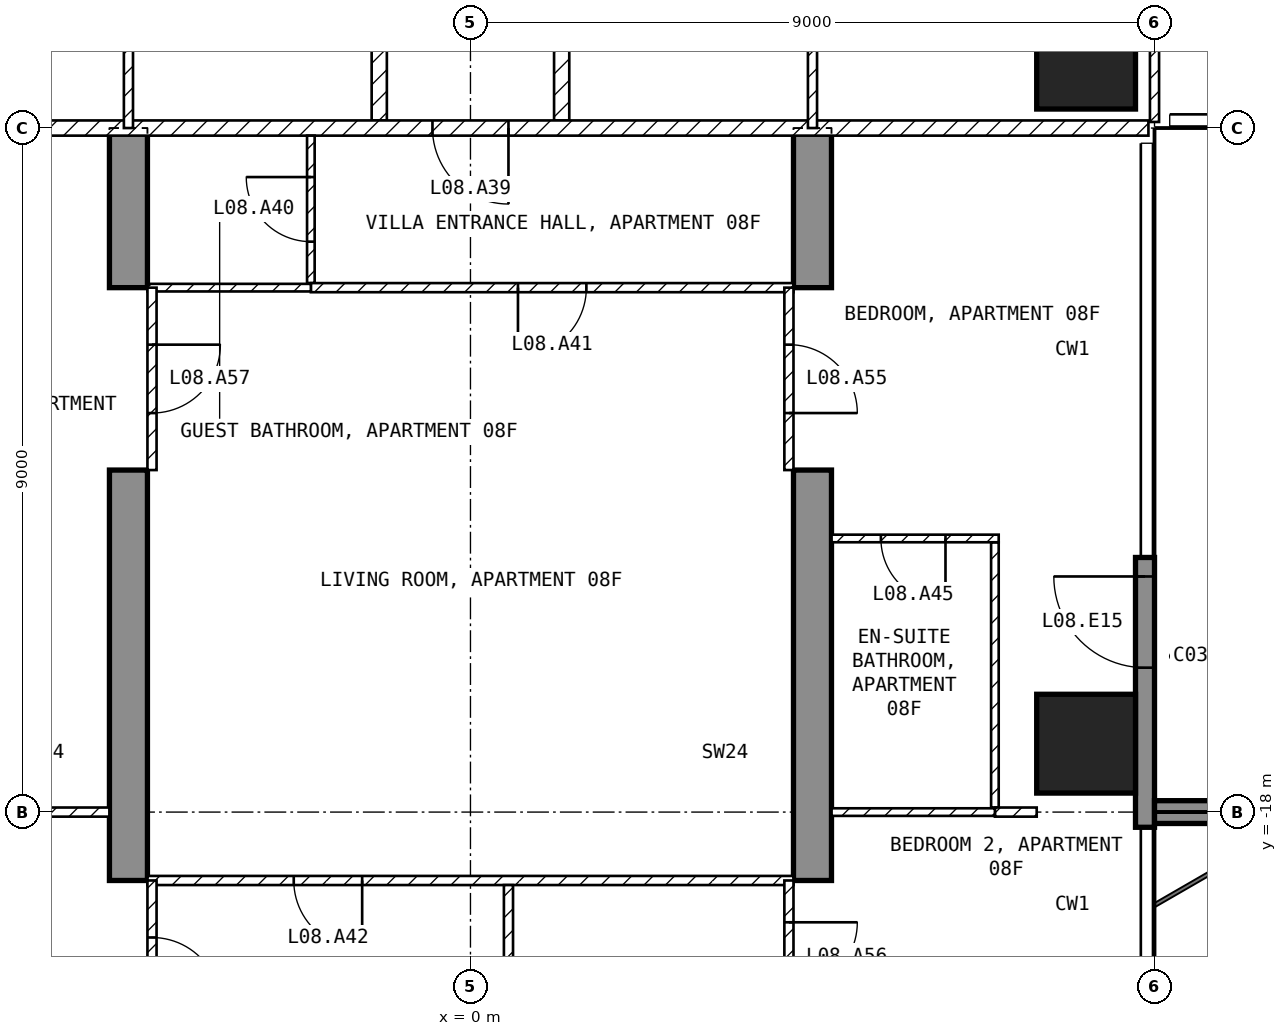
"""IFC4 building model, lengths in metres.
Left out: names, types, materials, properties, quantities, classifications, styles, units other than length and angle.
Written with IfcOpenShell. Run it as: python <this file> out.ifc"""

import sys

from ifc_helpers import new_model, si_unit, direction, frame, frame_2d, origin, origin_2d, place, context, subcontext, project, spatial, polyline, rectangle, outline, extrude, element, fill, save


model = new_model("IFC4")
c1 = context("Model", 3, precision=1e-05, world=origin(), true_north=direction((0.0, 1.0)))
c2 = subcontext(c1, "Body", "Model", "MODEL_VIEW")
j1 = project(units=[si_unit("LENGTHUNIT", "METRE"), si_unit("PLANEANGLEUNIT", "RADIAN")], contexts=[c1])
p1 = place(None, origin())
s1 = spatial("IfcSite", under=j1, at=p1, CompositionType="ELEMENT")
p2 = place(p1, origin())
s2 = spatial("IfcBuilding", under=s1, at=p2, CompositionType="ELEMENT")
p3 = place(p2, frame((0.0, 0.0, 47.0)))
s3 = spatial("IfcBuildingStorey", under=s2, at=p3, CompositionType="ELEMENT", Elevation=47.0)
for number, where, z_axis, x_axis in (
    (1, (8.1, -17.1, -0.25), (0.0, 0.0, 1.0), (1.0, 0.0, 0.0)),
    (2, (8.1, -8.1, -0.25), (0.0, 0.0, 1.0), (1.0, 0.0, 0.0)),
):
    element("IfcColumn", number, at=place(p3, frame(where, z_axis=z_axis, x_axis=x_axis)), inside=s3, PredefinedType="COLUMN", context=c2, shape_type="SweptSolid", body=[
        extrude(rectangle(XDim=1.3, YDim=1.3, at=origin_2d()), origin(), (0.0, 0.0, 1.0), 3.5),
    ])
for number, where, z_axis, x_axis in (
    (3, (-4.75, -25.45, -0.25), (1.0, 0.0, 0.0), (0.0, 1.0, 0.0)),
    (4, (4.25, -25.45, -0.25), (1.0, 0.0, 0.0), (0.0, 1.0, 0.0)),
):
    element("IfcWall", number, at=place(p3, frame(where, z_axis=z_axis, x_axis=x_axis)), inside=s3, PredefinedType="SHEAR", context=c2, shape_type="SweptSolid", body=[
        extrude(outline(polyline([(0.0, 0.0), (4.15, 0.0), (4.15, 2.65), (6.55, 2.65), (6.55, 0.0), (11.95, 0.0), (11.95, 2.65), (14.35, 2.65), (14.35, 0.0), (16.45, 0.0), (16.45, 3.5), (0.0, 3.5), (0.0, 0.0)])), origin(), (0.0, 0.0, 1.0), 0.5),
    ])
p4 = place(p3, frame((8.875, -18.2, 0.0), z_axis=(0.0, 0.0, 1.0), x_axis=(0.0, 1.0, 0.0)))
e5 = element("IfcWall", 5, at=p4, inside=s3, PredefinedType="SOLIDWALL", context=c2, shape_type="SweptSolid", body=[
    extrude(rectangle(XDim=3.55, YDim=0.25, at=frame_2d((1.775, 0.0))), origin(), (0.0, 0.0, 1.0), 3.25),
])
p5 = place(p4, frame((2.1, 0.0, 0.0)))
e6 = element("IfcOpeningElement", 6, at=p5, cuts=e5, PredefinedType="OPENING", context=c2, shape_type="SweptSolid", body=[
    extrude(rectangle(XDim=1.2, YDim=2.4, at=frame_2d((0.6, 1.2))), frame((0.0, 0.135, 0.0), z_axis=(0.0, -1.0, 0.0), x_axis=(1.0, 0.0, 0.0)), (0.0, 0.0, 1.0), 0.27),
])
p6 = place(p3, frame((9.0, -18.0, 0.0), z_axis=(0.0, 0.0, 1.0), x_axis=(1.0, 0.0, 0.0)))
e7 = element("IfcWall", 7, at=p6, inside=s3, PredefinedType="SOLIDWALL", context=c2, shape_type="SweptSolid", body=[
    extrude(rectangle(XDim=2.7, YDim=0.3, at=frame_2d((1.35, 0.0))), origin(), (0.0, 0.0, 1.0), 3.25),
])
for number, where, z_axis, x_axis in (
    (8, (1.2, -1.3, 0.0), (0.0, 0.0, 1.0), (0.0, -1.0, 0.0)),
    (9, (-1.2, -8.9, 0.0), (0.0, 0.0, 1.0), (0.0, 1.0, 0.0)),
):
    element("IfcWall", number, at=place(p3, frame(where, z_axis=z_axis, x_axis=x_axis)), inside=s3, PredefinedType="PARTITIONING", context=c2, shape_type="SweptSolid", body=[
        extrude(rectangle(XDim=7.6, YDim=0.2, at=frame_2d((3.8, 0.0))), origin(), (0.0, 0.0, 1.0), 3.25),
    ])
p7 = place(p3, frame((8.92, -9.0, 0.0), z_axis=(0.0, 0.0, 1.0), x_axis=(-1.0, 0.0, 0.0)))
e10 = element("IfcWall", 10, at=p7, inside=s3, PredefinedType="PARTITIONING", context=c2, shape_type="SweptSolid", body=[
    extrude(rectangle(XDim=17.84, YDim=0.2, at=frame_2d((8.92, 0.0))), origin(), (0.0, 0.0, 1.0), 3.25),
])
p8 = place(p7, frame((8.42, 0.0, 0.0)))
e11 = element("IfcOpeningElement", 11, at=p8, cuts=e10, PredefinedType="OPENING", context=c2, shape_type="SweptSolid", body=[
    extrude(rectangle(XDim=1.0, YDim=2.1, at=frame_2d((0.5, 1.05))), frame((0.0, 0.11, 0.0), z_axis=(0.0, -1.0, 0.0), x_axis=(1.0, 0.0, 0.0)), (0.0, 0.0, 1.0), 0.22),
])
p9 = place(p3, frame((9.0, -8.92, 0.0), z_axis=(0.0, 0.0, 1.0), x_axis=(0.0, 1.0, 0.0)))
e12 = element("IfcWall", 12, at=p9, inside=s3, PredefinedType="PARTITIONING", context=c2, shape_type="SweptSolid", body=[
    extrude(rectangle(XDim=7.62, YDim=0.12, at=frame_2d((3.81, 0.0))), origin(), (0.0, 0.0, 1.0), 3.25),
])
p10 = place(p9, frame((2.67, 0.0, 0.0)))
e13 = element("IfcOpeningElement", 13, at=p10, cuts=e12, PredefinedType="OPENING", context=c2, shape_type="SweptSolid", body=[
    extrude(rectangle(XDim=0.9, YDim=2.1, at=frame_2d((0.45, 1.05))), frame((0.0, 0.07, 0.0), z_axis=(0.0, -1.0, 0.0), x_axis=(1.0, 0.0, 0.0)), (0.0, 0.0, 1.0), 0.14),
])
p11 = place(p3, frame((4.5, -9.0, 0.0), z_axis=(0.0, 0.0, 1.0), x_axis=(0.0, 1.0, 0.0)))
e14 = element("IfcWall", 14, at=p11, inside=s3, PredefinedType="PARTITIONING", context=c2, shape_type="SweptSolid", body=[
    extrude(rectangle(XDim=3.9, YDim=0.12, at=frame_2d((1.95, 0.0))), origin(), (0.0, 0.0, 1.0), 3.25),
])
p12 = place(p11, frame((1.5, 0.0, 0.0)))
e15 = element("IfcOpeningElement", 15, at=p12, cuts=e14, PredefinedType="OPENING", context=c2, shape_type="SweptSolid", body=[
    extrude(rectangle(XDim=0.9, YDim=2.1, at=frame_2d((0.45, 1.05))), frame((0.0, 0.07, 0.0), z_axis=(0.0, -1.0, 0.0), x_axis=(1.0, 0.0, 0.0)), (0.0, 0.0, 1.0), 0.14),
])
p13 = place(p3, frame((-4.5, -1.3, 0.0), z_axis=(0.0, 0.0, 1.0), x_axis=(0.0, -1.0, 0.0)))
e16 = element("IfcWall", 16, at=p13, inside=s3, PredefinedType="PARTITIONING", context=c2, shape_type="SweptSolid", body=[
    extrude(rectangle(XDim=7.7, YDim=0.12, at=frame_2d((3.85, 0.0))), origin(), (0.0, 0.0, 1.0), 3.25),
])
p14 = place(p13, frame((4.988, 0.0, 0.0)))
e17 = element("IfcOpeningElement", 17, at=p14, cuts=e16, PredefinedType="OPENING", context=c2, shape_type="SweptSolid", body=[
    extrude(rectangle(XDim=0.9, YDim=2.1, at=frame_2d((0.45, 1.05))), frame((0.0, 0.07, 0.0), z_axis=(0.0, -1.0, 0.0), x_axis=(1.0, 0.0, 0.0)), (0.0, 0.0, 1.0), 0.14),
])
p15 = place(p3, frame((-2.1, -11.04, 0.0), z_axis=(0.0, 0.0, 1.0), x_axis=(0.0, 1.0, 0.0)))
e18 = element("IfcWall", 18, at=p15, inside=s3, PredefinedType="PARTITIONING", context=c2, shape_type="SweptSolid", body=[
    extrude(rectangle(XDim=1.94, YDim=0.1, at=frame_2d((0.97, 0.0))), origin(), (0.0, 0.0, 1.0), 3.25),
])
p16 = place(p15, frame((0.545, 0.0, 0.0)))
e19 = element("IfcOpeningElement", 19, at=p16, cuts=e18, PredefinedType="OPENING", context=c2, shape_type="SweptSolid", body=[
    extrude(rectangle(XDim=0.85, YDim=2.1, at=frame_2d((0.425, 1.05))), frame((0.0, 0.06, 0.0), z_axis=(0.0, -1.0, 0.0), x_axis=(1.0, 0.0, 0.0)), (0.0, 0.0, 1.0), 0.12),
])
p17 = place(p3, frame((4.25, -11.1, 0.0), z_axis=(0.0, 0.0, 1.0), x_axis=(-1.0, 0.0, 0.0)))
e20 = element("IfcWall", 20, at=p17, inside=s3, PredefinedType="PARTITIONING", context=c2, shape_type="SweptSolid", body=[
    extrude(rectangle(XDim=6.35, YDim=0.12, at=frame_2d((3.175, 0.0))), origin(), (0.0, 0.0, 1.0), 3.25),
])
p18 = place(p17, frame((2.725, 0.0, 0.0)))
e21 = element("IfcOpeningElement", 21, at=p18, cuts=e20, PredefinedType="OPENING", context=c2, shape_type="SweptSolid", body=[
    extrude(rectangle(XDim=0.9, YDim=2.1, at=frame_2d((0.45, 1.05))), frame((0.0, 0.07, 0.0), z_axis=(0.0, -1.0, 0.0), x_axis=(1.0, 0.0, 0.0)), (0.0, 0.0, 1.0), 0.14),
])
p19 = place(p3, frame((-2.1, -11.1, 0.0), z_axis=(0.0, 0.0, 1.0), x_axis=(-1.0, 0.0, 0.0)))
e22 = element("IfcWall", 22, at=p19, inside=s3, PredefinedType="PARTITIONING", context=c2, shape_type="SweptSolid", body=[
    extrude(rectangle(XDim=2.15, YDim=0.1, at=frame_2d((1.075, 0.0))), origin(), (0.0, 0.0, 1.0), 3.25),
])
p20 = place(p3, frame((4.25, -18.9, 0.0), z_axis=(0.0, 0.0, 1.0), x_axis=(-1.0, 0.0, 0.0)))
e23 = element("IfcWall", 23, at=p20, inside=s3, PredefinedType="PARTITIONING", context=c2, shape_type="SweptSolid", body=[
    extrude(rectangle(XDim=8.5, YDim=0.12, at=frame_2d((4.25, 0.0))), origin(), (0.0, 0.0, 1.0), 3.25),
])
p21 = place(p20, frame((5.675, 0.0, 0.0)))
e24 = element("IfcOpeningElement", 24, at=p21, cuts=e23, PredefinedType="OPENING", context=c2, shape_type="SweptSolid", body=[
    extrude(rectangle(XDim=0.9, YDim=2.1, at=frame_2d((0.45, 1.05))), frame((0.0, 0.07, 0.0), z_axis=(0.0, -1.0, 0.0), x_axis=(1.0, 0.0, 0.0)), (0.0, 0.0, 1.0), 0.14),
])
p22 = place(p3, frame((0.5, -18.96, 0.0), z_axis=(0.0, 0.0, 1.0), x_axis=(0.0, -1.0, 0.0)))
e25 = element("IfcWall", 25, at=p22, inside=s3, PredefinedType="PARTITIONING", context=c2, shape_type="SweptSolid", body=[
    extrude(rectangle(XDim=4.38, YDim=0.12, at=frame_2d((2.19, 0.0))), origin(), (0.0, 0.0, 1.0), 3.25),
])
p23 = place(p22, frame((1.74, 0.0, 0.0)))
e26 = element("IfcOpeningElement", 26, at=p23, cuts=e25, PredefinedType="OPENING", context=c2, shape_type="SweptSolid", body=[
    extrude(rectangle(XDim=0.9, YDim=2.1, at=frame_2d((0.45, 1.05))), frame((0.0, 0.07, 0.0), z_axis=(0.0, -1.0, 0.0), x_axis=(1.0, 0.0, 0.0)), (0.0, 0.0, 1.0), 0.14),
])
p24 = place(p3, frame((6.9, -17.94, 0.0), z_axis=(0.0, 0.0, 1.0), x_axis=(0.0, 1.0, 0.0)))
e27 = element("IfcWall", 27, at=p24, inside=s3, PredefinedType="PARTITIONING", context=c2, shape_type="SweptSolid", body=[
    extrude(rectangle(XDim=3.49, YDim=0.1, at=frame_2d((1.745, 0.0))), origin(), (0.0, 0.0, 1.0), 3.25),
])
p25 = place(p3, frame((6.95, -14.4, 0.0), z_axis=(0.0, 0.0, 1.0), x_axis=(-1.0, 0.0, 0.0)))
e28 = element("IfcWall", 28, at=p25, inside=s3, PredefinedType="PARTITIONING", context=c2, shape_type="SweptSolid", body=[
    extrude(rectangle(XDim=2.2, YDim=0.1, at=frame_2d((1.1, 0.0))), origin(), (0.0, 0.0, 1.0), 3.25),
])
p26 = place(p25, frame((0.7, 0.0, 0.0)))
e29 = element("IfcOpeningElement", 29, at=p26, cuts=e28, PredefinedType="OPENING", context=c2, shape_type="SweptSolid", body=[
    extrude(rectangle(XDim=0.85, YDim=2.1, at=frame_2d((0.425, 1.05))), frame((0.0, 0.06, 0.0), z_axis=(0.0, -1.0, 0.0), x_axis=(1.0, 0.0, 0.0)), (0.0, 0.0, 1.0), 0.12),
])
p27 = place(p3, frame((7.45, -18.0, 0.0), z_axis=(0.0, 0.0, 1.0), x_axis=(-1.0, 0.0, 0.0)))
e30 = element("IfcWall", 30, at=p27, inside=s3, PredefinedType="PARTITIONING", context=c2, shape_type="SweptSolid", body=[
    extrude(rectangle(XDim=0.55, YDim=0.12, at=frame_2d((0.275, 0.0))), origin(), (0.0, 0.0, 1.0), 3.25),
])
p28 = place(p3, frame((6.9, -18.0, 0.0), z_axis=(0.0, 0.0, 1.0), x_axis=(-1.0, 0.0, 0.0)))
e31 = element("IfcWall", 31, at=p28, inside=s3, PredefinedType="PARTITIONING", context=c2, shape_type="SweptSolid", body=[
    extrude(rectangle(XDim=2.15, YDim=0.1, at=frame_2d((1.075, 0.0))), origin(), (0.0, 0.0, 1.0), 3.25),
])
p29 = place(p3, frame((-4.75, -18.0, 0.0), z_axis=(0.0, 0.0, 1.0), x_axis=(-1.0, 0.0, 0.0)))
e32 = element("IfcWall", 32, at=p29, inside=s3, PredefinedType="PARTITIONING", context=c2, shape_type="SweptSolid", body=[
    extrude(rectangle(XDim=2.7, YDim=0.12, at=frame_2d((1.35, 0.0))), origin(), (0.0, 0.0, 1.0), 3.25),
])
p30 = place(p3, frame((4.19, -11.1, 0.0), z_axis=(0.0, 0.0, 1.0), x_axis=(0.0, -1.0, 0.0)))
e33 = element("IfcWall", 33, at=p30, inside=s3, PredefinedType="PARTITIONING", context=c2, shape_type="SweptSolid", body=[
    extrude(rectangle(XDim=2.4, YDim=0.12, at=frame_2d((1.2, 0.0))), origin(), (0.0, 0.0, 1.0), 2.4),
])
p31 = place(p30, frame((0.75, 0.0, 0.0)))
e34 = element("IfcOpeningElement", 34, at=p31, cuts=e33, PredefinedType="OPENING", context=c2, shape_type="SweptSolid", body=[
    extrude(rectangle(XDim=0.9, YDim=2.1, at=frame_2d((0.45, 1.05))), frame((0.0, 0.07, 0.0), z_axis=(0.0, -1.0, 0.0), x_axis=(1.0, 0.0, 0.0)), (0.0, 0.0, 1.0), 0.14),
])
p32 = place(p3, frame((4.19, -18.9, 0.0), z_axis=(0.0, 0.0, 1.0), x_axis=(0.0, -1.0, 0.0)))
e35 = element("IfcWall", 35, at=p32, inside=s3, PredefinedType="PARTITIONING", context=c2, shape_type="SweptSolid", body=[
    extrude(rectangle(XDim=2.4, YDim=0.12, at=frame_2d((1.2, 0.0))), origin(), (0.0, 0.0, 1.0), 2.4),
])
p33 = place(p32, frame((0.55, 0.0, 0.0)))
e36 = element("IfcOpeningElement", 36, at=p33, cuts=e35, PredefinedType="OPENING", context=c2, shape_type="SweptSolid", body=[
    extrude(rectangle(XDim=0.9, YDim=2.1, at=frame_2d((0.45, 1.05))), frame((0.0, 0.07, 0.0), z_axis=(0.0, -1.0, 0.0), x_axis=(1.0, 0.0, 0.0)), (0.0, 0.0, 1.0), 0.14),
])
p34 = place(p3, frame((-4.19, -11.1, 0.0), z_axis=(0.0, 0.0, 1.0), x_axis=(0.0, -1.0, 0.0)))
e37 = element("IfcWall", 37, at=p34, inside=s3, PredefinedType="PARTITIONING", context=c2, shape_type="SweptSolid", body=[
    extrude(rectangle(XDim=2.4, YDim=0.12, at=frame_2d((1.2, 0.0))), origin(), (0.0, 0.0, 1.0), 2.4),
])
p35 = place(p34, frame((0.75, 0.0, 0.0)))
e38 = element("IfcOpeningElement", 38, at=p35, cuts=e37, PredefinedType="OPENING", context=c2, shape_type="SweptSolid", body=[
    extrude(rectangle(XDim=0.9, YDim=2.1, at=frame_2d((0.45, 1.05))), frame((0.0, 0.07, 0.0), z_axis=(0.0, -1.0, 0.0), x_axis=(1.0, 0.0, 0.0)), (0.0, 0.0, 1.0), 0.14),
])
p36 = place(p3, frame((-4.19, -18.9, 0.0), z_axis=(0.0, 0.0, 1.0), x_axis=(0.0, -1.0, 0.0)))
e39 = element("IfcWall", 39, at=p36, inside=s3, PredefinedType="PARTITIONING", context=c2, shape_type="SweptSolid", body=[
    extrude(rectangle(XDim=2.4, YDim=0.12, at=frame_2d((1.2, 0.0))), origin(), (0.0, 0.0, 1.0), 2.4),
])
p37 = place(p36, frame((0.75, 0.0, 0.0)))
e40 = element("IfcOpeningElement", 40, at=p37, cuts=e39, PredefinedType="OPENING", context=c2, shape_type="SweptSolid", body=[
    extrude(rectangle(XDim=0.9, YDim=2.1, at=frame_2d((0.45, 1.05))), frame((0.0, 0.07, 0.0), z_axis=(0.0, -1.0, 0.0), x_axis=(1.0, 0.0, 0.0)), (0.0, 0.0, 1.0), 0.14),
])
p38 = place(p5, origin())
e41 = element("IfcDoor", 41, at=p38, inside=s3, OperationType="SINGLE_SWING_RIGHT", PredefinedType="DOOR", context=c2, shape_type="SweptSolid", body=[
    extrude(rectangle(XDim=1.2, YDim=2.4, at=frame_2d((0.6, 1.2))), frame((0.0, 0.025, 0.0), z_axis=(0.0, -1.0, 0.0), x_axis=(1.0, 0.0, 0.0)), (0.0, 0.0, 1.0), 0.05),
])
fill(e6, e41)
p39 = place(p8, origin())
e42 = element("IfcDoor", 42, at=p39, inside=s3, OperationType="SINGLE_SWING_LEFT", PredefinedType="DOOR", context=c2, shape_type="SweptSolid", body=[
    extrude(rectangle(XDim=1.0, YDim=2.1, at=frame_2d((0.5, 1.05))), frame((0.0, 0.025, 0.0), z_axis=(0.0, -1.0, 0.0), x_axis=(1.0, 0.0, 0.0)), (0.0, 0.0, 1.0), 0.05),
])
fill(e11, e42)
p40 = place(p16, origin())
e43 = element("IfcDoor", 43, at=p40, inside=s3, OperationType="SINGLE_SWING_RIGHT", PredefinedType="DOOR", context=c2, shape_type="SweptSolid", body=[
    extrude(rectangle(XDim=0.85, YDim=2.1, at=frame_2d((0.425, 1.05))), frame((0.0, 0.025, 0.0), z_axis=(0.0, -1.0, 0.0), x_axis=(1.0, 0.0, 0.0)), (0.0, 0.0, 1.0), 0.05),
])
fill(e19, e43)
p41 = place(p18, origin())
e44 = element("IfcDoor", 44, at=p41, inside=s3, OperationType="SINGLE_SWING_RIGHT", PredefinedType="DOOR", context=c2, shape_type="SweptSolid", body=[
    extrude(rectangle(XDim=0.9, YDim=2.1, at=frame_2d((0.45, 1.05))), frame((0.0, 0.025, 0.0), z_axis=(0.0, -1.0, 0.0), x_axis=(1.0, 0.0, 0.0)), (0.0, 0.0, 1.0), 0.05),
])
fill(e21, e44)
p42 = place(p21, origin())
e45 = element("IfcDoor", 45, at=p42, inside=s3, OperationType="SINGLE_SWING_LEFT", PredefinedType="DOOR", context=c2, shape_type="SweptSolid", body=[
    extrude(rectangle(XDim=0.9, YDim=2.1, at=frame_2d((0.45, 1.05))), frame((0.0, 0.025, 0.0), z_axis=(0.0, -1.0, 0.0), x_axis=(1.0, 0.0, 0.0)), (0.0, 0.0, 1.0), 0.05),
])
fill(e24, e45)
p43 = place(p26, origin())
e46 = element("IfcDoor", 46, at=p43, inside=s3, OperationType="SINGLE_SWING_LEFT", PredefinedType="DOOR", context=c2, shape_type="SweptSolid", body=[
    extrude(rectangle(XDim=0.85, YDim=2.1, at=frame_2d((0.425, 1.05))), frame((0.0, 0.025, 0.0), z_axis=(0.0, -1.0, 0.0), x_axis=(1.0, 0.0, 0.0)), (0.0, 0.0, 1.0), 0.05),
])
fill(e29, e46)
p44 = place(p31, origin())
e47 = element("IfcDoor", 47, at=p44, inside=s3, OperationType="SINGLE_SWING_RIGHT", PredefinedType="DOOR", context=c2, shape_type="SweptSolid", body=[
    extrude(rectangle(XDim=0.9, YDim=2.1, at=frame_2d((0.45, 1.05))), frame((0.0, 0.025, 0.0), z_axis=(0.0, -1.0, 0.0), x_axis=(1.0, 0.0, 0.0)), (0.0, 0.0, 1.0), 0.05),
])
fill(e34, e47)
p45 = place(p33, origin())
e48 = element("IfcDoor", 48, at=p45, inside=s3, OperationType="SINGLE_SWING_LEFT", PredefinedType="DOOR", context=c2, shape_type="SweptSolid", body=[
    extrude(rectangle(XDim=0.9, YDim=2.1, at=frame_2d((0.45, 1.05))), frame((0.0, 0.025, 0.0), z_axis=(0.0, -1.0, 0.0), x_axis=(1.0, 0.0, 0.0)), (0.0, 0.0, 1.0), 0.05),
])
fill(e36, e48)
p46 = place(p35, origin())
e49 = element("IfcDoor", 49, at=p46, inside=s3, OperationType="SINGLE_SWING_LEFT", PredefinedType="DOOR", context=c2, shape_type="SweptSolid", body=[
    extrude(rectangle(XDim=0.9, YDim=2.1, at=frame_2d((0.45, 1.05))), frame((0.0, 0.025, 0.0), z_axis=(0.0, -1.0, 0.0), x_axis=(1.0, 0.0, 0.0)), (0.0, 0.0, 1.0), 0.05),
])
fill(e38, e49)
p47 = place(p37, origin())
e50 = element("IfcDoor", 50, at=p47, inside=s3, OperationType="SINGLE_SWING_RIGHT", PredefinedType="DOOR", context=c2, shape_type="SweptSolid", body=[
    extrude(rectangle(XDim=0.9, YDim=2.1, at=frame_2d((0.45, 1.05))), frame((0.0, 0.025, 0.0), z_axis=(0.0, -1.0, 0.0), x_axis=(1.0, 0.0, 0.0)), (0.0, 0.0, 1.0), 0.05),
])
fill(e40, e50)
save(model, sys.argv[1])
